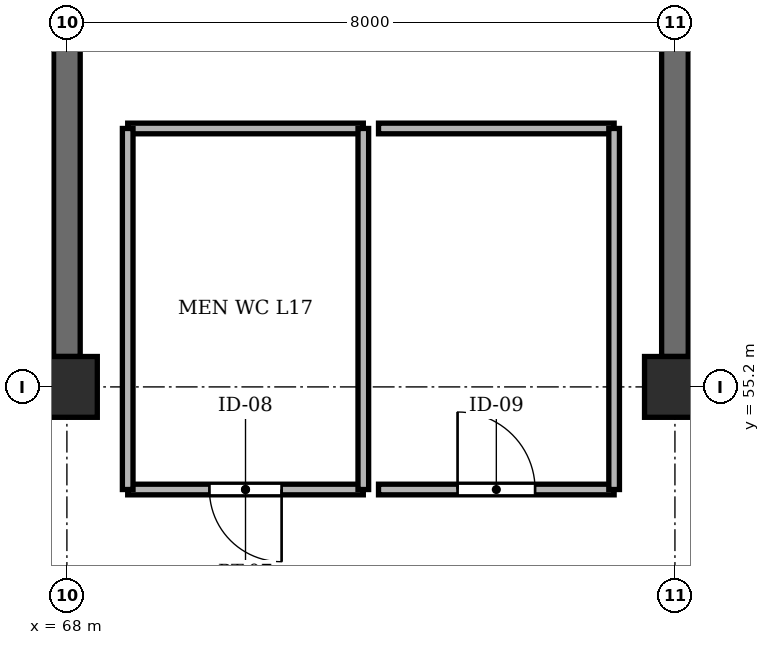
"""IFC4 building model, lengths in metres.
Left out: names, types, materials, properties, quantities, classifications, styles, units other than length and angle.
Written with IfcOpenShell. Run it as: python <this file> out.ifc"""

import sys

from ifc_helpers import new_model, si_unit, direction, frame, frame_2d, origin, origin_2d, place, context, subcontext, project, spatial, rectangle, extrude, element, fill, save


model = new_model("IFC4")
c1 = context("Model", 3, precision=1e-05, world=origin(), true_north=direction((0.0, 1.0)))
c2 = subcontext(c1, "Body", "Model", "MODEL_VIEW")
j1 = project(units=[si_unit("LENGTHUNIT", "METRE"), si_unit("PLANEANGLEUNIT", "RADIAN")], contexts=[c1])
p1 = place(None, origin())
s1 = spatial("IfcSite", under=j1, at=p1, CompositionType="ELEMENT")
p2 = place(p1, origin())
s2 = spatial("IfcBuilding", under=s1, at=p2, CompositionType="ELEMENT")
p3 = place(p2, frame((0.0, 0.0, 66.55)))
s3 = spatial("IfcBuildingStorey", under=s2, at=p3, CompositionType="ELEMENT", Elevation=66.55)
for number, where, z_axis, x_axis in (
    (1, (68.0, 55.2, -0.24), (0.0, 0.0, 1.0), (1.0, 0.0, 0.0)),
    (2, (76.0, 55.2, -0.24), (0.0, 0.0, 1.0), (1.0, 0.0, 0.0)),
):
    element("IfcColumn", number, at=place(p3, frame(where, z_axis=z_axis, x_axis=x_axis)), inside=s3, PredefinedType="COLUMN", context=c2, shape_type="SweptSolid", body=[
        extrude(rectangle(XDim=0.8, YDim=0.8, at=origin_2d()), origin(), (0.0, 0.0, 1.0), 3.19),
    ])
for number, where, z_axis, x_axis in (
    (3, (68.0, 55.6, 0.0), (0.0, 0.0, 1.0), (0.0, 1.0, 0.0)),
    (4, (76.0, 55.6, 0.0), (0.0, 0.0, 1.0), (0.0, 1.0, 0.0)),
):
    element("IfcWall", number, at=place(p3, frame(where, z_axis=z_axis, x_axis=x_axis)), inside=s3, PredefinedType="SHEAR", context=c2, shape_type="SweptSolid", body=[
        extrude(rectangle(XDim=6.5, YDim=0.35, at=frame_2d((3.25, 0.0))), origin(), (0.0, 0.0, 1.0), 2.95),
    ])
p4 = place(p3, frame((68.8, 53.85, 0.0), z_axis=(0.0, 0.0, 1.0), x_axis=(1.0, 0.0, 0.0)))
e5 = element("IfcWall", 5, at=p4, inside=s3, PredefinedType="PARTITIONING", context=c2, shape_type="SweptSolid", body=[
    extrude(rectangle(XDim=3.1, YDim=0.14, at=frame_2d((1.55, 0.0))), origin(), (0.0, 0.0, 1.0), 2.53),
])
p5 = place(p4, frame((1.075, 0.0, 0.0)))
e6 = element("IfcOpeningElement", 6, at=p5, cuts=e5, PredefinedType="OPENING", context=c2, shape_type="SweptSolid", body=[
    extrude(rectangle(XDim=0.95, YDim=2.1, at=frame_2d((0.475, 1.05))), frame((0.0, 0.082, 0.0), z_axis=(0.0, -1.0, 0.0), x_axis=(1.0, 0.0, 0.0)), (0.0, 0.0, 1.0), 0.164),
])
p6 = place(p3, frame((68.8, 58.6, 0.0), z_axis=(0.0, 0.0, 1.0), x_axis=(1.0, 0.0, 0.0)))
e7 = element("IfcWall", 7, at=p6, inside=s3, PredefinedType="PARTITIONING", context=c2, shape_type="SweptSolid", body=[
    extrude(rectangle(XDim=3.1, YDim=0.14, at=frame_2d((1.55, 0.0))), origin(), (0.0, 0.0, 1.0), 2.53),
])
for number, where, z_axis, x_axis in (
    (8, (68.8, 53.85, 0.0), (0.0, 0.0, 1.0), (0.0, 1.0, 0.0)),
    (9, (71.9, 53.85, 0.0), (0.0, 0.0, 1.0), (0.0, 1.0, 0.0)),
):
    element("IfcWall", number, at=place(p3, frame(where, z_axis=z_axis, x_axis=x_axis)), inside=s3, PredefinedType="PARTITIONING", context=c2, shape_type="SweptSolid", body=[
        extrude(rectangle(XDim=4.75, YDim=0.14, at=frame_2d((2.375, 0.0))), origin(), (0.0, 0.0, 1.0), 2.53),
    ])
p7 = place(p3, frame((72.1, 53.85, 0.0), z_axis=(0.0, 0.0, 1.0), x_axis=(1.0, 0.0, 0.0)))
e10 = element("IfcWall", 10, at=p7, inside=s3, PredefinedType="PARTITIONING", context=c2, shape_type="SweptSolid", body=[
    extrude(rectangle(XDim=3.1, YDim=0.14, at=frame_2d((1.55, 0.0))), origin(), (0.0, 0.0, 1.0), 2.53),
])
p8 = place(p7, frame((1.04, 0.0, 0.0)))
e11 = element("IfcOpeningElement", 11, at=p8, cuts=e10, PredefinedType="OPENING", context=c2, shape_type="SweptSolid", body=[
    extrude(rectangle(XDim=1.02, YDim=2.1, at=frame_2d((0.51, 1.05))), frame((0.0, 0.082, 0.0), z_axis=(0.0, -1.0, 0.0), x_axis=(1.0, 0.0, 0.0)), (0.0, 0.0, 1.0), 0.164),
])
p9 = place(p3, frame((72.1, 58.6, 0.0), z_axis=(0.0, 0.0, 1.0), x_axis=(1.0, 0.0, 0.0)))
e12 = element("IfcWall", 12, at=p9, inside=s3, PredefinedType="PARTITIONING", context=c2, shape_type="SweptSolid", body=[
    extrude(rectangle(XDim=3.1, YDim=0.14, at=frame_2d((1.55, 0.0))), origin(), (0.0, 0.0, 1.0), 2.53),
])
p10 = place(p3, frame((75.2, 53.85, 0.0), z_axis=(0.0, 0.0, 1.0), x_axis=(0.0, 1.0, 0.0)))
e13 = element("IfcWall", 13, at=p10, inside=s3, PredefinedType="PARTITIONING", context=c2, shape_type="SweptSolid", body=[
    extrude(rectangle(XDim=4.75, YDim=0.14, at=frame_2d((2.375, 0.0))), origin(), (0.0, 0.0, 1.0), 2.53),
])
p11 = place(p5, frame((0.95, 0.0, 0.0), z_axis=(0.0, 0.0, 1.0), x_axis=(-1.0, 0.0, 0.0)))
e14 = element("IfcDoor", 14, at=p11, inside=s3, OperationType="SINGLE_SWING_RIGHT", PredefinedType="DOOR", context=c2, shape_type="SweptSolid", body=[
    extrude(rectangle(XDim=0.95, YDim=2.1, at=frame_2d((0.475, 1.05))), frame((0.0, 0.025, 0.0), z_axis=(0.0, -1.0, 0.0), x_axis=(1.0, 0.0, 0.0)), (0.0, 0.0, 1.0), 0.05),
])
fill(e6, e14)
p12 = place(p8, origin())
e15 = element("IfcDoor", 15, at=p12, inside=s3, OperationType="SINGLE_SWING_LEFT", PredefinedType="DOOR", context=c2, shape_type="SweptSolid", body=[
    extrude(rectangle(XDim=1.02, YDim=2.1, at=frame_2d((0.51, 1.05))), frame((0.0, 0.025, 0.0), z_axis=(0.0, -1.0, 0.0), x_axis=(1.0, 0.0, 0.0)), (0.0, 0.0, 1.0), 0.05),
])
fill(e11, e15)
save(model, sys.argv[1])
